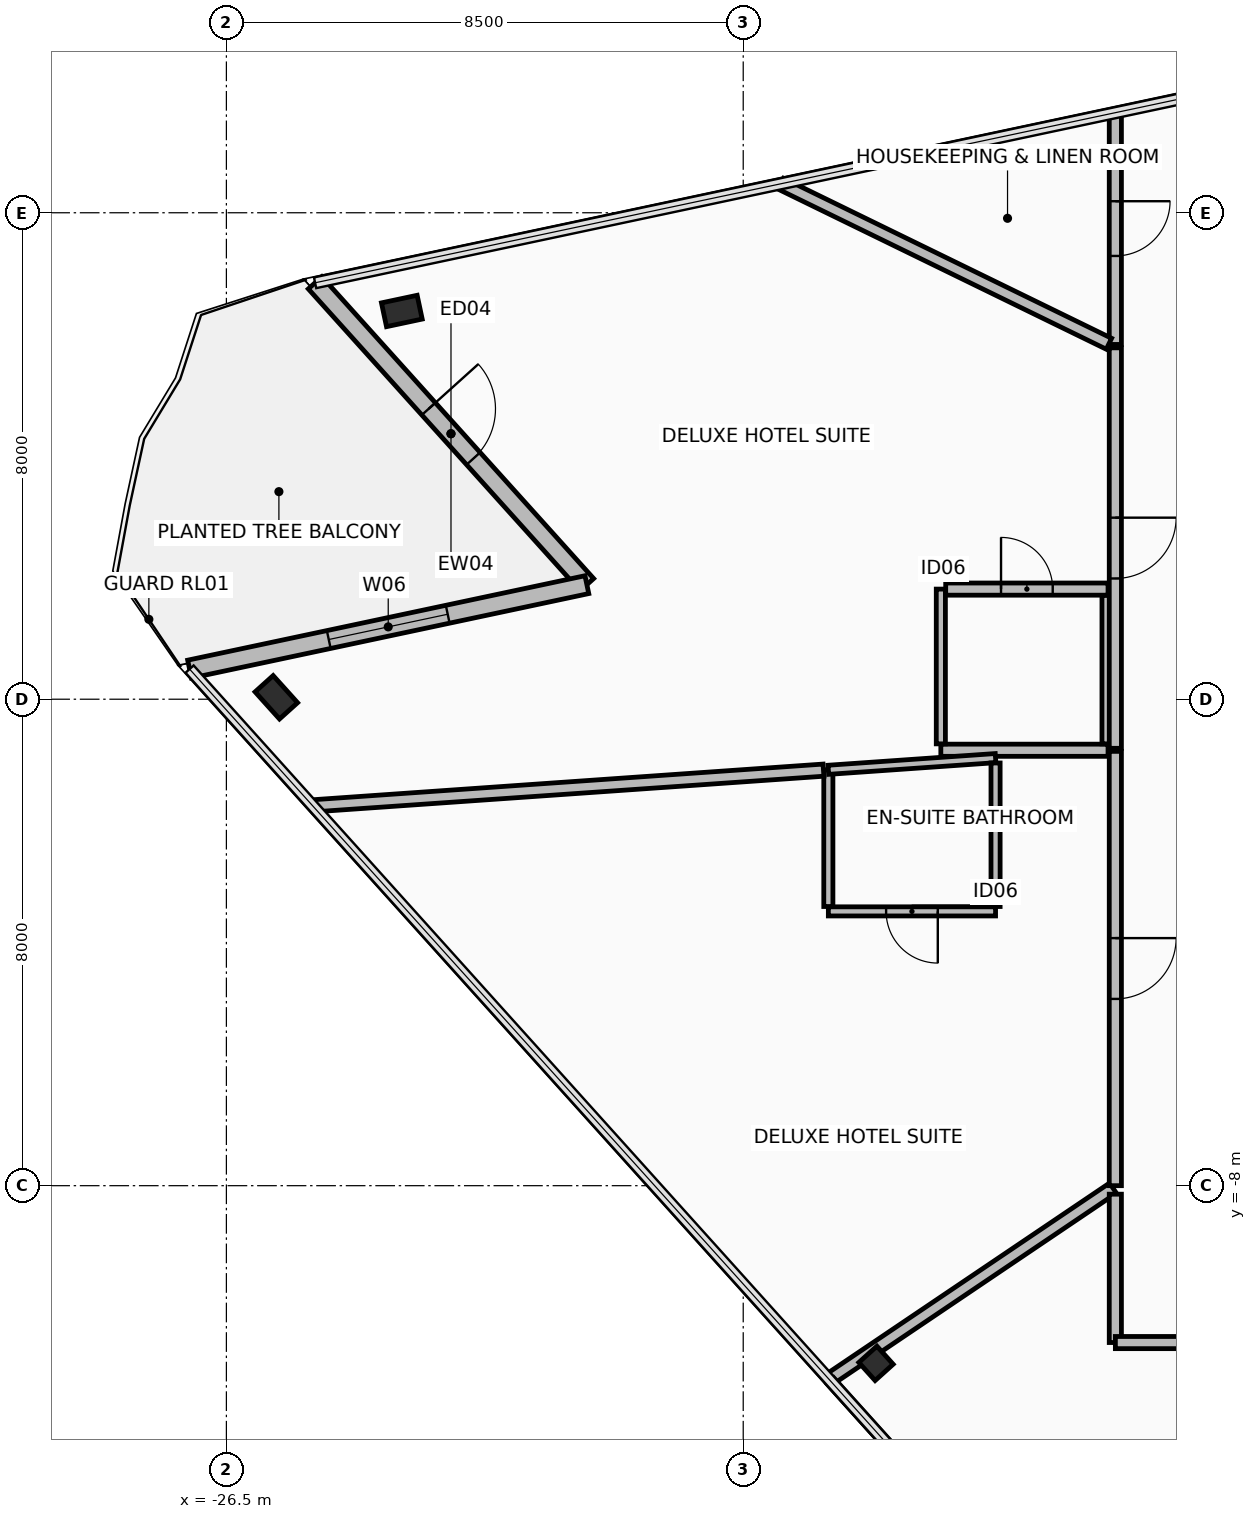
"""IFC4 building model, lengths in metres.
Left out: names, types, materials, properties, quantities, classifications, styles, units other than length and angle.
Written with IfcOpenShell. Run it as: python <this file> out.ifc"""

import sys

from ifc_helpers import new_model, si_unit, direction, frame, frame_2d, origin, origin_2d, place, context, subcontext, project, spatial, rectangle, hollow_rectangle, extrude, element, fill, save


model = new_model("IFC4")
c1 = context("Model", 3, precision=1e-05, world=origin(), true_north=direction((0.0, 1.0)))
c2 = subcontext(c1, "Body", "Model", "MODEL_VIEW")
j1 = project(units=[si_unit("LENGTHUNIT", "METRE"), si_unit("PLANEANGLEUNIT", "RADIAN")], contexts=[c1])
p1 = place(None, origin())
s1 = spatial("IfcSite", under=j1, at=p1, CompositionType="ELEMENT")
p2 = place(p1, origin())
s2 = spatial("IfcBuilding", under=s1, at=p2, CompositionType="ELEMENT")
p3 = place(p2, frame((0.0, 0.0, 287.05)))
s3 = spatial("IfcBuildingStorey", under=s2, at=p3, CompositionType="ELEMENT", Elevation=287.05)
p4 = place(p3, frame((-25.679, 0.032, 0.0), z_axis=(0.0, 0.0, 1.0), x_axis=(-0.669130606359, 0.743144825477, 0.0)))
e1 = element("IfcColumn", 1, at=p4, inside=s3, PredefinedType="COLUMN", context=c2, shape_type="SweptSolid", body=[
    extrude(hollow_rectangle(XDim=0.4, YDim=0.6, WallThickness=0.03, at=origin_2d()), origin(), (0.0, 0.0, 1.0), 3.65),
])
p5 = place(p3, frame((-15.816, -10.922, 0.0), z_axis=(0.0, 0.0, 1.0), x_axis=(-0.669130606359, 0.743144825477, 0.0)))
e2 = element("IfcColumn", 2, at=p5, inside=s3, PredefinedType="COLUMN", context=c2, shape_type="SweptSolid", body=[
    extrude(hollow_rectangle(XDim=0.4, YDim=0.4, WallThickness=0.025, at=origin_2d()), origin(), (0.0, 0.0, 1.0), 3.65),
])
p6 = place(p3, frame((-23.615, 6.385, 0.0), z_axis=(0.0, 0.0, 1.0), x_axis=(0.978147237858, 0.207913398007, 0.0)))
e3 = element("IfcColumn", 3, at=p6, inside=s3, PredefinedType="COLUMN", context=c2, shape_type="SweptSolid", body=[
    extrude(hollow_rectangle(XDim=0.4, YDim=0.6, WallThickness=0.03, at=origin_2d()), origin(), (0.0, 0.0, 1.0), 3.65),
])
p7 = place(p3, frame((-25.041, 6.848, 0.0), z_axis=(0.0, 0.0, 1.0), x_axis=(0.669132313306, -0.743143288532, 0.0)))
e4 = element("IfcWall", 4, at=p7, inside=s3, PredefinedType="STANDARD", context=c2, shape_type="SweptSolid", body=[
    extrude(rectangle(XDim=6.68, YDim=0.3, at=frame_2d((3.34, 0.0))), origin(), (0.0, 0.0, 1.0), 2.81),
])
p8 = place(p7, frame((2.79, 0.0, 0.0)))
e5 = element("IfcOpeningElement", 5, at=p8, cuts=e4, PredefinedType="OPENING", context=c2, shape_type="SweptSolid", body=[
    extrude(rectangle(XDim=1.1, YDim=2.2, at=frame_2d((0.55, 1.1))), frame((0.0, 0.16, 0.0), z_axis=(0.0, -1.0, 0.0), x_axis=(1.0, 0.0, 0.0)), (0.0, 0.0, 1.0), 0.32),
])
p9 = place(p3, frame((-20.571, 1.884, 0.0), z_axis=(0.0, 0.0, 1.0), x_axis=(-0.978145008547, -0.207923885724, 0.0)))
e6 = element("IfcWall", 6, at=p9, inside=s3, PredefinedType="STANDARD", context=c2, shape_type="SweptSolid", body=[
    extrude(rectangle(XDim=6.68, YDim=0.3, at=frame_2d((3.34, 0.0))), origin(), (0.0, 0.0, 1.0), 2.81),
])
p10 = place(p9, frame((2.34, 0.0, 0.25)))
e7 = element("IfcOpeningElement", 7, at=p10, cuts=e6, PredefinedType="OPENING", context=c2, shape_type="SweptSolid", body=[
    extrude(rectangle(XDim=2.0, YDim=2.4, at=frame_2d((1.0, 1.2))), frame((0.0, 0.16, 0.0), z_axis=(0.0, -1.0, 0.0), x_axis=(1.0, 0.0, 0.0)), (0.0, 0.0, 1.0), 0.32),
])
p11 = place(p3, frame((-12.0, -0.839, 0.0), z_axis=(0.0, 0.0, 1.0), x_axis=(-1.0, 0.0, 0.0)))
e8 = element("IfcWall", 8, at=p11, inside=s3, PredefinedType="PARTITIONING", context=c2, shape_type="SweptSolid", body=[
    extrude(rectangle(XDim=2.75, YDim=0.2, at=frame_2d((1.375, 0.0))), origin(), (0.0, 0.0, 1.0), 3.465),
])
p12 = place(p3, frame((-14.75, -0.734, 0.0), z_axis=(0.0, 0.0, 1.0), x_axis=(0.0, 1.0, 0.0)))
e9 = element("IfcWall", 9, at=p12, inside=s3, PredefinedType="PARTITIONING", context=c2, shape_type="SweptSolid", body=[
    extrude(rectangle(XDim=2.545, YDim=0.15, at=frame_2d((1.272, 0.0))), origin(), (0.0, 0.0, 1.0), 3.465),
])
p13 = place(p3, frame((-14.67, 1.811, 0.0), z_axis=(0.0, 0.0, 1.0), x_axis=(1.0, 0.0, 0.0)))
e10 = element("IfcWall", 10, at=p13, inside=s3, PredefinedType="PARTITIONING", context=c2, shape_type="SweptSolid", body=[
    extrude(rectangle(XDim=2.67, YDim=0.2, at=frame_2d((1.335, 0.0))), origin(), (0.0, 0.0, 1.0), 3.465),
])
p14 = place(p13, frame((0.91, 0.0, 0.0)))
e11 = element("IfcOpeningElement", 11, at=p14, cuts=e10, PredefinedType="OPENING", context=c2, shape_type="SweptSolid", body=[
    extrude(rectangle(XDim=0.85, YDim=2.1, at=frame_2d((0.425, 1.05))), frame((0.0, 0.11, 0.0), z_axis=(0.0, -1.0, 0.0), x_axis=(1.0, 0.0, 0.0)), (0.0, 0.0, 1.0), 0.22),
])
p15 = place(p3, frame((-12.0, 1.706, 0.0), z_axis=(0.0, 0.0, 1.0), x_axis=(0.0, -1.0, 0.0)))
e12 = element("IfcWall", 12, at=p15, inside=s3, PredefinedType="PARTITIONING", context=c2, shape_type="SweptSolid", body=[
    extrude(rectangle(XDim=2.44, YDim=0.2, at=frame_2d((1.22, 0.0))), origin(), (0.0, 0.0, 1.0), 3.465),
])
p16 = place(p3, frame((-13.85, -3.489, 0.0), z_axis=(0.0, 0.0, 1.0), x_axis=(-1.0, 0.0, 0.0)))
e13 = element("IfcWall", 13, at=p16, inside=s3, PredefinedType="PARTITIONING", context=c2, shape_type="SweptSolid", body=[
    extrude(rectangle(XDim=2.75, YDim=0.15, at=frame_2d((1.375, 0.0))), origin(), (0.0, 0.0, 1.0), 3.22),
])
p17 = place(p16, frame((0.95, 0.0, 0.0)))
e14 = element("IfcOpeningElement", 14, at=p17, cuts=e13, PredefinedType="OPENING", context=c2, shape_type="SweptSolid", body=[
    extrude(rectangle(XDim=0.85, YDim=2.1, at=frame_2d((0.425, 1.05))), frame((0.0, 0.085, 0.0), z_axis=(0.0, -1.0, 0.0), x_axis=(1.0, 0.0, 0.0)), (0.0, 0.0, 1.0), 0.17),
])
p18 = place(p3, frame((-16.6, -3.409, 0.0), z_axis=(0.0, 0.0, 1.0), x_axis=(0.0, 1.0, 0.0)))
e15 = element("IfcWall", 15, at=p18, inside=s3, PredefinedType="PARTITIONING", context=c2, shape_type="SweptSolid", body=[
    extrude(rectangle(XDim=2.248, YDim=0.15, at=frame_2d((1.124, 0.0))), origin(), (0.0, 0.0, 1.0), 3.465),
])
p19 = place(p3, frame((-16.6, -1.161, 0.0), z_axis=(0.0, 0.0, 1.0), x_axis=(0.997561927417, 0.069786825178, 0.0)))
e16 = element("IfcWall", 16, at=p19, inside=s3, PredefinedType="PARTITIONING", context=c2, shape_type="SweptSolid", body=[
    extrude(rectangle(XDim=2.757, YDim=0.15, at=frame_2d((1.378, 0.0))), origin(), (0.0, 0.0, 1.0), 3.22),
])
p20 = place(p3, frame((-13.85, -1.049, 0.0), z_axis=(0.0, 0.0, 1.0), x_axis=(0.0, -1.0, 0.0)))
e17 = element("IfcWall", 17, at=p20, inside=s3, PredefinedType="PARTITIONING", context=c2, shape_type="SweptSolid", body=[
    extrude(rectangle(XDim=2.361, YDim=0.15, at=frame_2d((1.18, 0.0))), origin(), (0.0, 0.0, 1.0), 3.465),
])
p21 = place(p3, frame((-16.562, -11.171, 0.0), z_axis=(0.0, 0.0, 1.0), x_axis=(0.829047221476, 0.559178598091, 0.0)))
e18 = element("IfcWall", 18, at=p21, inside=s3, PredefinedType="PARTITIONING", context=c2, shape_type="SweptSolid", body=[
    extrude(rectangle(XDim=5.601, YDim=0.2, at=frame_2d((2.8, 0.0))), origin(), (0.0, 0.0, 1.0), 2.81),
])
p22 = place(p3, frame((-11.88, -8.14, 0.0), z_axis=(0.0, 0.0, 1.0), x_axis=(0.0, -1.0, 0.0)))
e19 = element("IfcWall", 19, at=p22, inside=s3, PredefinedType="PARTITIONING", context=c2, shape_type="SweptSolid", body=[
    extrude(rectangle(XDim=2.439, YDim=0.2, at=frame_2d((1.22, 0.0))), origin(), (0.0, 0.0, 1.0), 2.96),
])
p23 = place(p3, frame((-11.879, -10.58, 0.0), z_axis=(0.0, 0.0, 1.0), x_axis=(1.0, 0.0, 0.0)))
e20 = element("IfcWall", 20, at=p23, inside=s3, PredefinedType="PARTITIONING", context=c2, shape_type="SweptSolid", body=[
    extrude(rectangle(XDim=6.679, YDim=0.2, at=frame_2d((3.34, 0.0))), origin(), (0.0, 0.0, 1.0), 3.22),
])
p24 = place(p23, frame((2.915, 0.0, 0.0)))
e21 = element("IfcOpeningElement", 21, at=p24, cuts=e20, PredefinedType="OPENING", context=c2, shape_type="SweptSolid", body=[
    extrude(rectangle(XDim=0.85, YDim=2.1, at=frame_2d((0.425, 1.05))), frame((0.0, 0.11, 0.0), z_axis=(0.0, -1.0, 0.0), x_axis=(1.0, 0.0, 0.0)), (0.0, 0.0, 1.0), 0.22),
])
p25 = place(p3, frame((-9.443, -19.121, 0.0), z_axis=(0.0, 0.0, 1.0), x_axis=(-0.669126879752, 0.743148180912, 0.0)))
e22 = element("IfcWall", 22, at=p25, inside=s3, PredefinedType="PARTITIONING", context=c2, shape_type="SweptSolid", body=[
    extrude(rectangle(XDim=10.647, YDim=0.15, at=frame_2d((5.323, 0.0))), origin(), (0.0, 0.0, 1.0), 3.465),
])
p26 = place(p3, frame((-11.88, 9.646, 0.0), z_axis=(0.0, 0.0, 1.0), x_axis=(0.0, -1.0, 0.0)))
e23 = element("IfcWall", 23, at=p26, inside=s3, PredefinedType="PARTITIONING", context=c2, shape_type="SweptSolid", body=[
    extrude(rectangle(XDim=3.812, YDim=0.2, at=frame_2d((1.906, 0.0))), origin(), (0.0, 0.0, 1.0), 2.81),
])
p27 = place(p26, frame((1.456, 0.0, 0.0)))
e24 = element("IfcOpeningElement", 24, at=p27, cuts=e23, PredefinedType="OPENING", context=c2, shape_type="SweptSolid", body=[
    extrude(rectangle(XDim=0.9, YDim=2.1, at=frame_2d((0.45, 1.05))), frame((0.0, 0.11, 0.0), z_axis=(0.0, -1.0, 0.0), x_axis=(1.0, 0.0, 0.0)), (0.0, 0.0, 1.0), 0.22),
])
p28 = place(p3, frame((-11.985, 5.845, 0.0), z_axis=(0.0, 0.0, 1.0), x_axis=(-0.898777045876, 0.438406001107, 0.0)))
e25 = element("IfcWall", 25, at=p28, inside=s3, PredefinedType="PARTITIONING", context=c2, shape_type="SweptSolid", body=[
    extrude(rectangle(XDim=6.002, YDim=0.2, at=frame_2d((3.001, 0.0))), origin(), (0.0, 0.0, 1.0), 2.81),
])
p29 = place(p3, frame((-11.88, 5.779, 0.0), z_axis=(0.0, 0.0, 1.0), x_axis=(0.0, -1.0, 0.0)))
e26 = element("IfcWall", 26, at=p29, inside=s3, PredefinedType="PARTITIONING", context=c2, shape_type="SweptSolid", body=[
    extrude(rectangle(XDim=6.586, YDim=0.2, at=frame_2d((3.293, 0.0))), origin(), (0.0, 0.0, 1.0), 3.465),
])
p30 = place(p29, frame((2.793, 0.0, 0.0)))
e27 = element("IfcOpeningElement", 27, at=p30, cuts=e26, PredefinedType="OPENING", context=c2, shape_type="SweptSolid", body=[
    extrude(rectangle(XDim=1.0, YDim=2.15, at=frame_2d((0.5, 1.075))), frame((0.0, 0.11, 0.0), z_axis=(0.0, -1.0, 0.0), x_axis=(1.0, 0.0, 0.0)), (0.0, 0.0, 1.0), 0.22),
])
p31 = place(p3, frame((-16.68, -1.167, 0.0), z_axis=(0.0, 0.0, 1.0), x_axis=(-0.997565152075, -0.069740715271, 0.0)))
e28 = element("IfcWall", 28, at=p31, inside=s3, PredefinedType="PARTITIONING", context=c2, shape_type="SweptSolid", body=[
    extrude(rectangle(XDim=8.409, YDim=0.2, at=frame_2d((4.204, 0.0))), origin(), (0.0, 0.0, 1.0), 2.81),
])
p32 = place(p3, frame((-11.88, -0.857, 0.0), z_axis=(0.0, 0.0, 1.0), x_axis=(0.0, -1.0, 0.0)))
e29 = element("IfcWall", 29, at=p32, inside=s3, PredefinedType="PARTITIONING", context=c2, shape_type="SweptSolid", body=[
    extrude(rectangle(XDim=7.143, YDim=0.2, at=frame_2d((3.571, 0.0))), origin(), (0.0, 0.0, 1.0), 3.465),
])
p33 = place(p32, frame((3.071, 0.0, 0.0)))
e30 = element("IfcOpeningElement", 30, at=p33, cuts=e29, PredefinedType="OPENING", context=c2, shape_type="SweptSolid", body=[
    extrude(rectangle(XDim=1.0, YDim=2.15, at=frame_2d((0.5, 1.075))), frame((0.0, 0.11, 0.0), z_axis=(0.0, -1.0, 0.0), x_axis=(1.0, 0.0, 0.0)), (0.0, 0.0, 1.0), 0.22),
])
p34 = place(p8, origin())
e31 = element("IfcDoor", 31, at=p34, inside=s3, OperationType="SINGLE_SWING_LEFT", PredefinedType="DOOR", context=c2, shape_type="SweptSolid", body=[
    extrude(rectangle(XDim=1.1, YDim=2.2, at=frame_2d((0.55, 1.1))), frame((0.0, 0.025, 0.0), z_axis=(0.0, -1.0, 0.0), x_axis=(1.0, 0.0, 0.0)), (0.0, 0.0, 1.0), 0.05),
])
fill(e5, e31)
p35 = place(p10, origin())
e32 = element("IfcWindow", 32, at=p35, inside=s3, PartitioningType="SINGLE_PANEL", PredefinedType="WINDOW", context=c2, shape_type="SweptSolid", body=[
    extrude(rectangle(XDim=2.0, YDim=2.4, at=frame_2d((1.0, 1.2))), frame((0.0, 0.03, 0.0), z_axis=(0.0, -1.0, 0.0), x_axis=(1.0, 0.0, 0.0)), (0.0, 0.0, 1.0), 0.06),
])
fill(e7, e32)
p36 = place(p14, origin())
e33 = element("IfcDoor", 33, at=p36, inside=s3, OperationType="SINGLE_SWING_RIGHT", PredefinedType="DOOR", context=c2, shape_type="SweptSolid", body=[
    extrude(rectangle(XDim=0.85, YDim=2.1, at=frame_2d((0.425, 1.05))), frame((0.0, 0.025, 0.0), z_axis=(0.0, -1.0, 0.0), x_axis=(1.0, 0.0, 0.0)), (0.0, 0.0, 1.0), 0.05),
])
fill(e11, e33)
p37 = place(p17, origin())
e34 = element("IfcDoor", 34, at=p37, inside=s3, OperationType="SINGLE_SWING_RIGHT", PredefinedType="DOOR", context=c2, shape_type="SweptSolid", body=[
    extrude(rectangle(XDim=0.85, YDim=2.1, at=frame_2d((0.425, 1.05))), frame((0.0, 0.025, 0.0), z_axis=(0.0, -1.0, 0.0), x_axis=(1.0, 0.0, 0.0)), (0.0, 0.0, 1.0), 0.05),
])
fill(e14, e34)
p38 = place(p27, origin())
e35 = element("IfcDoor", 35, at=p38, inside=s3, OperationType="SINGLE_SWING_LEFT", PredefinedType="DOOR", context=c2, shape_type="SweptSolid", body=[
    extrude(rectangle(XDim=0.9, YDim=2.1, at=frame_2d((0.45, 1.05))), frame((0.0, 0.025, 0.0), z_axis=(0.0, -1.0, 0.0), x_axis=(1.0, 0.0, 0.0)), (0.0, 0.0, 1.0), 0.05),
])
fill(e24, e35)
p39 = place(p30, origin())
e36 = element("IfcDoor", 36, at=p39, inside=s3, OperationType="SINGLE_SWING_LEFT", PredefinedType="DOOR", context=c2, shape_type="SweptSolid", body=[
    extrude(rectangle(XDim=1.0, YDim=2.15, at=frame_2d((0.5, 1.075))), frame((0.0, 0.025, 0.0), z_axis=(0.0, -1.0, 0.0), x_axis=(1.0, 0.0, 0.0)), (0.0, 0.0, 1.0), 0.05),
])
fill(e27, e36)
p40 = place(p33, origin())
e37 = element("IfcDoor", 37, at=p40, inside=s3, OperationType="SINGLE_SWING_LEFT", PredefinedType="DOOR", context=c2, shape_type="SweptSolid", body=[
    extrude(rectangle(XDim=1.0, YDim=2.15, at=frame_2d((0.5, 1.075))), frame((0.0, 0.025, 0.0), z_axis=(0.0, -1.0, 0.0), x_axis=(1.0, 0.0, 0.0)), (0.0, 0.0, 1.0), 0.05),
])
fill(e30, e37)
save(model, sys.argv[1])
